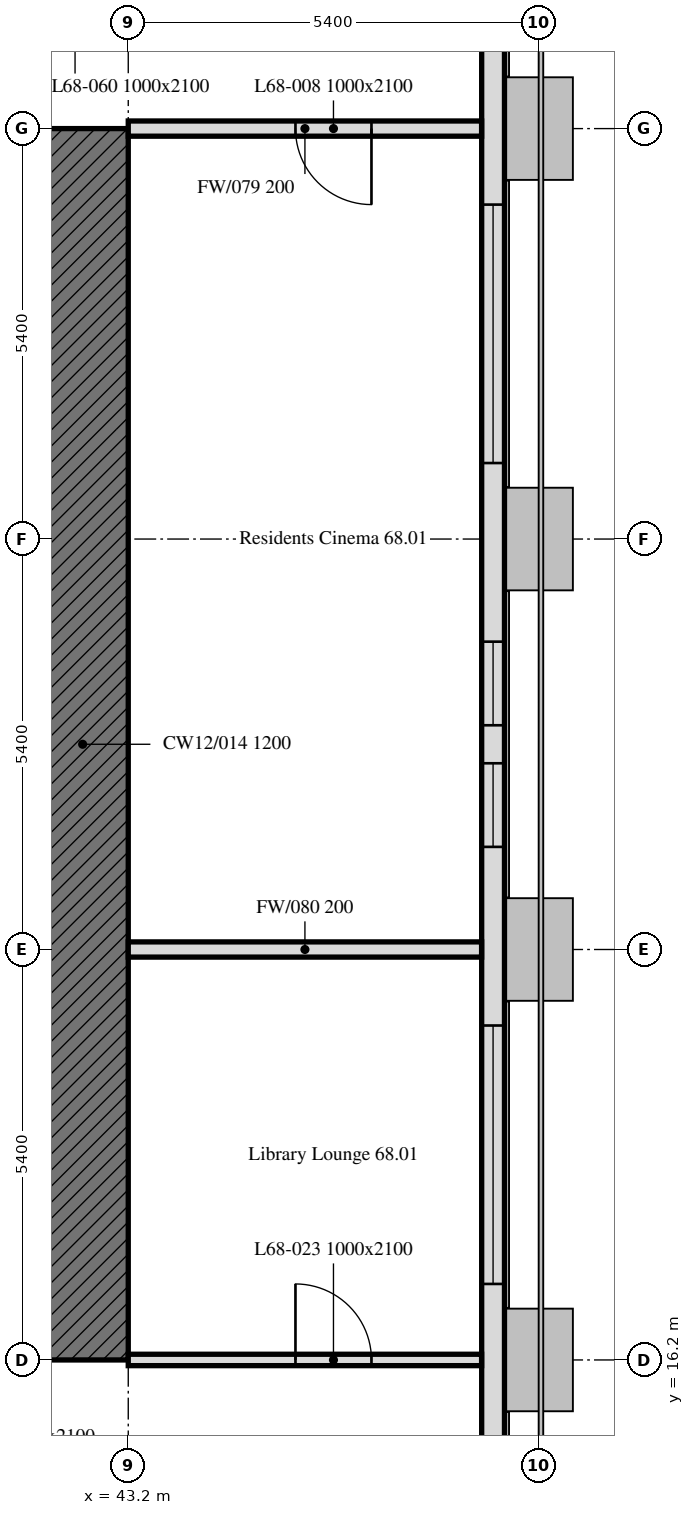
"""IFC4 building model, lengths in metres.
Left out: names, types, materials, properties, quantities, classifications, styles, units other than length and angle.
Written with IfcOpenShell. Run it as: python <this file> out.ifc"""

import sys

from ifc_helpers import new_model, si_unit, direction, frame, frame_2d, origin, place, context, subcontext, project, spatial, rectangle, extrude, element, fill, save


model = new_model("IFC4")
c1 = context("Model", 3, precision=1e-05, world=origin(), true_north=direction((0.0, 1.0)))
c2 = subcontext(c1, "Body", "Model", "MODEL_VIEW")
j1 = project(units=[si_unit("LENGTHUNIT", "METRE"), si_unit("PLANEANGLEUNIT", "RADIAN")], contexts=[c1])
p1 = place(None, origin())
s1 = spatial("IfcSite", under=j1, at=p1, CompositionType="ELEMENT")
p2 = place(p1, origin())
s2 = spatial("IfcBuilding", under=s1, at=p2, CompositionType="ELEMENT")
p3 = place(p2, frame((0.0, 0.0, 278.5)))
s3 = spatial("IfcBuildingStorey", under=s2, at=p3, CompositionType="ELEMENT", Elevation=278.5)
p4 = place(p3, frame((48.0, 5.586, 0.0), z_axis=(0.0, 0.0, 1.0), x_axis=(0.0, 1.0, 0.0)))
e1 = element("IfcWall", 1, at=p4, inside=s3, PredefinedType="SOLIDWALL", context=c2, shape_type="SweptSolid", body=[
    extrude(rectangle(XDim=32.027, YDim=0.3, at=frame_2d((16.014, 0.0))), origin(), (0.0, 0.0, 1.0), 3.0),
])
p5 = place(p4, frame((1.789, 0.0, 0.9)))
e2 = element("IfcOpeningElement", 2, at=p5, cuts=e1, PredefinedType="OPENING", context=c2, shape_type="SweptSolid", body=[
    extrude(rectangle(XDim=0.65, YDim=1.7, at=frame_2d((0.325, 0.85))), frame((0.0, 0.16, 0.0), z_axis=(0.0, -1.0, 0.0), x_axis=(1.0, 0.0, 0.0)), (0.0, 0.0, 1.0), 0.32),
])
p6 = place(p4, frame((2.764, 0.0, 0.9)))
e3 = element("IfcOpeningElement", 3, at=p6, cuts=e1, PredefinedType="OPENING", context=c2, shape_type="SweptSolid", body=[
    extrude(rectangle(XDim=1.1, YDim=1.7, at=frame_2d((0.55, 0.85))), frame((0.0, 0.16, 0.0), z_axis=(0.0, -1.0, 0.0), x_axis=(1.0, 0.0, 0.0)), (0.0, 0.0, 1.0), 0.32),
])
p7 = place(p4, frame((6.564, 0.0, 0.9)))
e4 = element("IfcOpeningElement", 4, at=p7, cuts=e1, PredefinedType="OPENING", context=c2, shape_type="SweptSolid", body=[
    extrude(rectangle(XDim=1.1, YDim=1.7, at=frame_2d((0.55, 0.85))), frame((0.0, 0.16, 0.0), z_axis=(0.0, -1.0, 0.0), x_axis=(1.0, 0.0, 0.0)), (0.0, 0.0, 1.0), 0.32),
])
p8 = place(p4, frame((7.989, 0.0, 0.9)))
e5 = element("IfcOpeningElement", 5, at=p8, cuts=e1, PredefinedType="OPENING", context=c2, shape_type="SweptSolid", body=[
    extrude(rectangle(XDim=0.65, YDim=1.7, at=frame_2d((0.325, 0.85))), frame((0.0, 0.16, 0.0), z_axis=(0.0, -1.0, 0.0), x_axis=(1.0, 0.0, 0.0)), (0.0, 0.0, 1.0), 0.32),
])
p9 = place(p4, frame((11.614, 0.0, 0.9)))
e6 = element("IfcOpeningElement", 6, at=p9, cuts=e1, PredefinedType="OPENING", context=c2, shape_type="SweptSolid", body=[
    extrude(rectangle(XDim=3.4, YDim=1.7, at=frame_2d((1.7, 0.85))), frame((0.0, 0.16, 0.0), z_axis=(0.0, -1.0, 0.0), x_axis=(1.0, 0.0, 0.0)), (0.0, 0.0, 1.0), 0.32),
])
p10 = place(p4, frame((17.364, 0.0, 0.9)))
e7 = element("IfcOpeningElement", 7, at=p10, cuts=e1, PredefinedType="OPENING", context=c2, shape_type="SweptSolid", body=[
    extrude(rectangle(XDim=1.1, YDim=1.7, at=frame_2d((0.55, 0.85))), frame((0.0, 0.16, 0.0), z_axis=(0.0, -1.0, 0.0), x_axis=(1.0, 0.0, 0.0)), (0.0, 0.0, 1.0), 0.32),
])
p11 = place(p4, frame((18.964, 0.0, 0.9)))
e8 = element("IfcOpeningElement", 8, at=p11, cuts=e1, PredefinedType="OPENING", context=c2, shape_type="SweptSolid", body=[
    extrude(rectangle(XDim=1.1, YDim=1.7, at=frame_2d((0.55, 0.85))), frame((0.0, 0.16, 0.0), z_axis=(0.0, -1.0, 0.0), x_axis=(1.0, 0.0, 0.0)), (0.0, 0.0, 1.0), 0.32),
])
p12 = place(p4, frame((22.414, 0.0, 0.9)))
e9 = element("IfcOpeningElement", 9, at=p12, cuts=e1, PredefinedType="OPENING", context=c2, shape_type="SweptSolid", body=[
    extrude(rectangle(XDim=3.4, YDim=1.7, at=frame_2d((1.7, 0.85))), frame((0.0, 0.16, 0.0), z_axis=(0.0, -1.0, 0.0), x_axis=(1.0, 0.0, 0.0)), (0.0, 0.0, 1.0), 0.32),
])
p13 = place(p4, frame((28.789, 0.0, 0.9)))
e10 = element("IfcOpeningElement", 10, at=p13, cuts=e1, PredefinedType="OPENING", context=c2, shape_type="SweptSolid", body=[
    extrude(rectangle(XDim=0.65, YDim=1.7, at=frame_2d((0.325, 0.85))), frame((0.0, 0.16, 0.0), z_axis=(0.0, -1.0, 0.0), x_axis=(1.0, 0.0, 0.0)), (0.0, 0.0, 1.0), 0.32),
])
p14 = place(p4, frame((29.764, 0.0, 0.9)))
e11 = element("IfcOpeningElement", 11, at=p14, cuts=e1, PredefinedType="OPENING", context=c2, shape_type="SweptSolid", body=[
    extrude(rectangle(XDim=1.1, YDim=1.7, at=frame_2d((0.55, 0.85))), frame((0.0, 0.16, 0.0), z_axis=(0.0, -1.0, 0.0), x_axis=(1.0, 0.0, 0.0)), (0.0, 0.0, 1.0), 0.32),
])
p15 = place(p3, frame((42.6, 32.4, 0.0), z_axis=(0.0, 0.0, 1.0), x_axis=(0.0, -1.0, 0.0)))
e12 = element("IfcWall", 12, at=p15, inside=s3, PredefinedType="SOLIDWALL", context=c2, shape_type="SweptSolid", body=[
    extrude(rectangle(XDim=16.2, YDim=1.2, at=frame_2d((8.1, 0.0))), origin(), (0.0, 0.0, 1.0), 3.0),
])
p16 = place(p3, frame((47.849, 32.4, 0.0), z_axis=(0.0, 0.0, 1.0), x_axis=(-1.0, 0.0, 0.0)))
e13 = element("IfcWall", 13, at=p16, inside=s3, PredefinedType="PARTITIONING", context=c2, shape_type="SweptSolid", body=[
    extrude(rectangle(XDim=4.649, YDim=0.2, at=frame_2d((2.325, 0.0))), origin(), (0.0, 0.0, 1.0), 2.4),
])
p17 = place(p16, frame((1.449, 0.0, 0.0)))
e14 = element("IfcOpeningElement", 14, at=p17, cuts=e13, PredefinedType="OPENING", context=c2, shape_type="SweptSolid", body=[
    extrude(rectangle(XDim=1.0, YDim=2.1, at=frame_2d((0.5, 1.05))), frame((0.0, 0.1, 0.0), z_axis=(0.0, -1.0, 0.0), x_axis=(1.0, 0.0, 0.0)), (0.0, 0.0, 1.0), 0.2),
])
p18 = place(p3, frame((43.2, 21.6, 0.0), z_axis=(0.0, 0.0, 1.0), x_axis=(1.0, 0.0, 0.0)))
e15 = element("IfcWall", 15, at=p18, inside=s3, PredefinedType="PARTITIONING", context=c2, shape_type="SweptSolid", body=[
    extrude(rectangle(XDim=4.649, YDim=0.2, at=frame_2d((2.325, 0.0))), origin(), (0.0, 0.0, 1.0), 2.4),
])
p19 = place(p3, frame((43.2, 16.2, 0.0), z_axis=(0.0, 0.0, 1.0), x_axis=(1.0, 0.0, 0.0)))
e16 = element("IfcWall", 16, at=p19, inside=s3, PredefinedType="PARTITIONING", context=c2, shape_type="SweptSolid", body=[
    extrude(rectangle(XDim=4.649, YDim=0.15, at=frame_2d((2.325, 0.0))), origin(), (0.0, 0.0, 1.0), 2.4),
])
p20 = place(p19, frame((2.2, 0.0, 0.0)))
e17 = element("IfcOpeningElement", 17, at=p20, cuts=e16, PredefinedType="OPENING", context=c2, shape_type="SweptSolid", body=[
    extrude(rectangle(XDim=1.0, YDim=2.1, at=frame_2d((0.5, 1.05))), frame((0.0, 0.075, 0.0), z_axis=(0.0, -1.0, 0.0), x_axis=(1.0, 0.0, 0.0)), (0.0, 0.0, 1.0), 0.15),
])
p21 = place(p9, origin())
e18 = element("IfcWindow", 18, at=p21, inside=s3, PartitioningType="SINGLE_PANEL", PredefinedType="WINDOW", context=c2, shape_type="SweptSolid", body=[
    extrude(rectangle(XDim=3.4, YDim=1.7, at=frame_2d((1.7, 0.85))), frame((0.0, 0.03, 0.0), z_axis=(0.0, -1.0, 0.0), x_axis=(1.0, 0.0, 0.0)), (0.0, 0.0, 1.0), 0.06),
])
fill(e6, e18)
p22 = place(p10, origin())
e19 = element("IfcWindow", 19, at=p22, inside=s3, PartitioningType="SINGLE_PANEL", PredefinedType="WINDOW", context=c2, shape_type="SweptSolid", body=[
    extrude(rectangle(XDim=1.1, YDim=1.7, at=frame_2d((0.55, 0.85))), frame((0.0, 0.03, 0.0), z_axis=(0.0, -1.0, 0.0), x_axis=(1.0, 0.0, 0.0)), (0.0, 0.0, 1.0), 0.06),
])
fill(e7, e19)
p23 = place(p11, origin())
e20 = element("IfcWindow", 20, at=p23, inside=s3, PartitioningType="SINGLE_PANEL", PredefinedType="WINDOW", context=c2, shape_type="SweptSolid", body=[
    extrude(rectangle(XDim=1.1, YDim=1.7, at=frame_2d((0.55, 0.85))), frame((0.0, 0.03, 0.0), z_axis=(0.0, -1.0, 0.0), x_axis=(1.0, 0.0, 0.0)), (0.0, 0.0, 1.0), 0.06),
])
fill(e8, e20)
p24 = place(p12, origin())
e21 = element("IfcWindow", 21, at=p24, inside=s3, PartitioningType="SINGLE_PANEL", PredefinedType="WINDOW", context=c2, shape_type="SweptSolid", body=[
    extrude(rectangle(XDim=3.4, YDim=1.7, at=frame_2d((1.7, 0.85))), frame((0.0, 0.03, 0.0), z_axis=(0.0, -1.0, 0.0), x_axis=(1.0, 0.0, 0.0)), (0.0, 0.0, 1.0), 0.06),
])
fill(e9, e21)
p25 = place(p17, origin())
e22 = element("IfcDoor", 22, at=p25, inside=s3, OperationType="SINGLE_SWING_LEFT", PredefinedType="DOOR", context=c2, shape_type="SweptSolid", body=[
    extrude(rectangle(XDim=1.0, YDim=2.1, at=frame_2d((0.5, 1.05))), frame((0.0, 0.025, 0.0), z_axis=(0.0, -1.0, 0.0), x_axis=(1.0, 0.0, 0.0)), (0.0, 0.0, 1.0), 0.05),
])
fill(e14, e22)
p26 = place(p20, origin())
e23 = element("IfcDoor", 23, at=p26, inside=s3, OperationType="SINGLE_SWING_LEFT", PredefinedType="DOOR", context=c2, shape_type="SweptSolid", body=[
    extrude(rectangle(XDim=1.0, YDim=2.1, at=frame_2d((0.5, 1.05))), frame((0.0, 0.025, 0.0), z_axis=(0.0, -1.0, 0.0), x_axis=(1.0, 0.0, 0.0)), (0.0, 0.0, 1.0), 0.05),
])
fill(e17, e23)
save(model, sys.argv[1])
